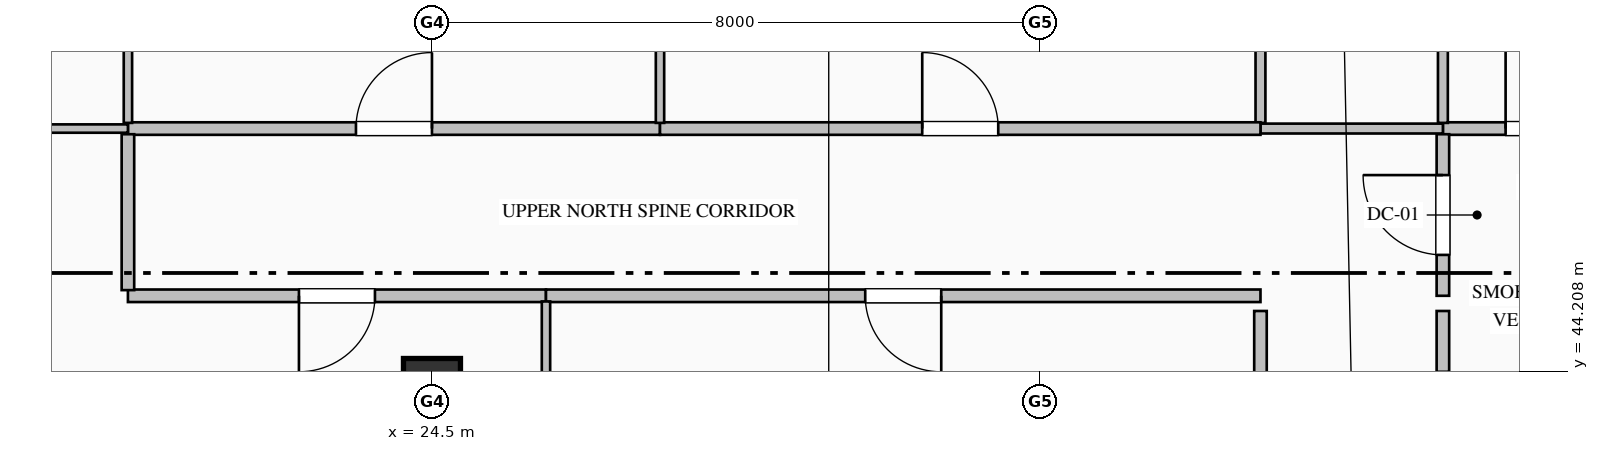
"""IFC4 building model, lengths in metres.
Left out: names, types, materials, properties, quantities, classifications, styles, units other than length and angle.
Written with IfcOpenShell. Run it as: python <this file> out.ifc"""

import sys

from ifc_helpers import new_model, si_unit, direction, frame, frame_2d, origin, origin_2d, place, context, subcontext, project, spatial, rectangle, extrude, element, fill, save


model = new_model("IFC4")
c1 = context("Model", 3, precision=1e-05, world=origin(), true_north=direction((0.0, 1.0)))
c2 = subcontext(c1, "Body", "Model", "MODEL_VIEW")
j1 = project(units=[si_unit("LENGTHUNIT", "METRE"), si_unit("PLANEANGLEUNIT", "RADIAN")], contexts=[c1])
p1 = place(None, origin())
s1 = spatial("IfcSite", under=j1, at=p1, CompositionType="ELEMENT")
p2 = place(p1, origin())
s2 = spatial("IfcBuilding", under=s1, at=p2, CompositionType="ELEMENT")
p3 = place(p2, frame((0.0, 0.0, 343.2)))
s3 = spatial("IfcBuildingStorey", under=s2, at=p3, CompositionType="ELEMENT", Elevation=343.2)
p4 = place(p3, frame((24.5, 44.0, 0.0), z_axis=(0.0, 0.0, 1.0), x_axis=(1.0, 0.0, 0.0)))
e1 = element("IfcColumn", 1, at=p4, inside=s3, PredefinedType="COLUMN", context=c2, shape_type="SweptSolid", body=[
    extrude(rectangle(XDim=0.75, YDim=0.75, at=origin_2d()), origin(), (0.0, 0.0, 1.0), 4.0),
])
p5 = place(p3, frame((16.62, 47.88, 0.0), z_axis=(0.0, 0.0, 1.0), x_axis=(0.707106781187, 0.707106781187, 0.0)))
e2 = element("IfcWall", 2, at=p5, inside=s3, PredefinedType="SOLIDWALL", context=c2, shape_type="SweptSolid", body=[
    extrude(rectangle(XDim=5.657, YDim=0.34, at=frame_2d((2.828, 0.0))), origin(), (0.0, 0.0, 1.0), 3.785),
])
p6 = place(p3, frame((37.8, 47.4, 0.0), z_axis=(0.0, 0.0, 1.0), x_axis=(1.0, 0.0, 0.0)))
e3 = element("IfcWall", 3, at=p6, inside=s3, PredefinedType="PARTITIONING", context=c2, shape_type="SweptSolid", body=[
    extrude(rectangle(XDim=2.7, YDim=0.165, at=frame_2d((1.35, 0.0))), origin(), (0.0, 0.0, 1.0), 3.785),
])
p7 = place(p6, frame((0.825, 0.0, 0.0)))
e4 = element("IfcOpeningElement", 4, at=p7, cuts=e3, PredefinedType="OPENING", context=c2, shape_type="SweptSolid", body=[
    extrude(rectangle(XDim=1.05, YDim=2.15, at=frame_2d((0.525, 1.075))), frame((0.0, 0.093, 0.0), z_axis=(0.0, -1.0, 0.0), x_axis=(1.0, 0.0, 0.0)), (0.0, 0.0, 1.0), 0.185),
])
p8 = place(p3, frame((37.8, 45.2, 0.0), z_axis=(0.0, 0.0, 1.0), x_axis=(0.0, 1.0, 0.0)))
e5 = element("IfcWall", 5, at=p8, inside=s3, PredefinedType="PARTITIONING", context=c2, shape_type="SweptSolid", body=[
    extrude(rectangle(XDim=2.125, YDim=0.165, at=frame_2d((1.063, 0.0))), origin(), (0.0, 0.0, 1.0), 3.785),
])
p9 = place(p8, frame((0.538, 0.0, 0.0)))
e6 = element("IfcOpeningElement", 6, at=p9, cuts=e5, PredefinedType="OPENING", context=c2, shape_type="SweptSolid", body=[
    extrude(rectangle(XDim=1.05, YDim=2.15, at=frame_2d((0.525, 1.075))), frame((0.0, 0.093, 0.0), z_axis=(0.0, -1.0, 0.0), x_axis=(1.0, 0.0, 0.0)), (0.0, 0.0, 1.0), 0.185),
])
p10 = place(p3, frame((37.8, 44.2, 0.0), z_axis=(0.0, 0.0, 1.0), x_axis=(0.0, 1.0, 0.0)))
e7 = element("IfcWall", 7, at=p10, inside=s3, PredefinedType="PARTITIONING", context=c2, shape_type="SweptSolid", body=[
    extrude(rectangle(XDim=0.8, YDim=0.165, at=frame_2d((0.4, 0.0))), origin(), (0.0, 0.0, 1.0), 3.785),
])
p11 = place(p3, frame((37.8, 47.475, 0.0), z_axis=(0.0, 0.0, 1.0), x_axis=(0.0, 1.0, 0.0)))
e8 = element("IfcWall", 8, at=p11, inside=s3, PredefinedType="PARTITIONING", context=c2, shape_type="SweptSolid", body=[
    extrude(rectangle(XDim=4.193, YDim=0.13, at=frame_2d((2.097, 0.0))), origin(), (0.0, 0.0, 1.0), 3.785),
])
p12 = place(p11, frame((1.587, 0.0, 0.0)))
e9 = element("IfcOpeningElement", 9, at=p12, cuts=e8, PredefinedType="OPENING", context=c2, shape_type="SweptSolid", body=[
    extrude(rectangle(XDim=1.02, YDim=2.15, at=frame_2d((0.51, 1.075))), frame((0.0, 0.075, 0.0), z_axis=(0.0, -1.0, 0.0), x_axis=(1.0, 0.0, 0.0)), (0.0, 0.0, 1.0), 0.15),
])
p13 = place(p3, frame((37.8, 47.4, 0.0), z_axis=(0.0, 0.0, 1.0), x_axis=(-1.0, 0.0, 0.0)))
e10 = element("IfcWall", 10, at=p13, inside=s3, PredefinedType="PARTITIONING", context=c2, shape_type="SweptSolid", body=[
    extrude(rectangle(XDim=2.4, YDim=0.13, at=frame_2d((1.2, 0.0))), origin(), (0.0, 0.0, 1.0), 3.785),
])
p14 = place(p3, frame((35.4, 47.475, 0.0), z_axis=(0.0, 0.0, 1.0), x_axis=(0.0, 1.0, 0.0)))
e11 = element("IfcWall", 11, at=p14, inside=s3, PredefinedType="PARTITIONING", context=c2, shape_type="SweptSolid", body=[
    extrude(rectangle(XDim=4.193, YDim=0.13, at=frame_2d((2.097, 0.0))), origin(), (0.0, 0.0, 1.0), 3.785),
])
p15 = place(p3, frame((20.5, 47.4, 0.0), z_axis=(0.0, 0.0, 1.0), x_axis=(1.0, 0.0, 0.0)))
e12 = element("IfcWall", 12, at=p15, inside=s3, PredefinedType="PARTITIONING", context=c2, shape_type="SweptSolid", body=[
    extrude(rectangle(XDim=7.0, YDim=0.165, at=frame_2d((3.5, 0.0))), origin(), (0.0, 0.0, 1.0), 3.785),
])
p16 = place(p15, frame((3.0, 0.0, 0.0)))
e13 = element("IfcOpeningElement", 13, at=p16, cuts=e12, PredefinedType="OPENING", context=c2, shape_type="SweptSolid", body=[
    extrude(rectangle(XDim=1.0, YDim=2.15, at=frame_2d((0.5, 1.075))), frame((0.0, 0.093, 0.0), z_axis=(0.0, -1.0, 0.0), x_axis=(1.0, 0.0, 0.0)), (0.0, 0.0, 1.0), 0.185),
])
p17 = place(p3, frame((27.5, 47.4, 0.0), z_axis=(0.0, 0.0, 1.0), x_axis=(1.0, 0.0, 0.0)))
e14 = element("IfcWall", 14, at=p17, inside=s3, PredefinedType="PARTITIONING", context=c2, shape_type="SweptSolid", body=[
    extrude(rectangle(XDim=7.9, YDim=0.165, at=frame_2d((3.95, 0.0))), origin(), (0.0, 0.0, 1.0), 3.785),
])
p18 = place(p17, frame((3.45, 0.0, 0.0)))
e15 = element("IfcOpeningElement", 15, at=p18, cuts=e14, PredefinedType="OPENING", context=c2, shape_type="SweptSolid", body=[
    extrude(rectangle(XDim=1.0, YDim=2.15, at=frame_2d((0.5, 1.075))), frame((0.0, 0.093, 0.0), z_axis=(0.0, -1.0, 0.0), x_axis=(1.0, 0.0, 0.0)), (0.0, 0.0, 1.0), 0.185),
])
p19 = place(p3, frame((26.0, 45.2, 0.0), z_axis=(0.0, 0.0, 1.0), x_axis=(-1.0, 0.0, 0.0)))
e16 = element("IfcWall", 16, at=p19, inside=s3, PredefinedType="PARTITIONING", context=c2, shape_type="SweptSolid", body=[
    extrude(rectangle(XDim=5.5, YDim=0.165, at=frame_2d((2.75, 0.0))), origin(), (0.0, 0.0, 1.0), 3.785),
])
p20 = place(p19, frame((2.25, 0.0, 0.0)))
e17 = element("IfcOpeningElement", 17, at=p20, cuts=e16, PredefinedType="OPENING", context=c2, shape_type="SweptSolid", body=[
    extrude(rectangle(XDim=1.0, YDim=2.15, at=frame_2d((0.5, 1.075))), frame((0.0, 0.093, 0.0), z_axis=(0.0, -1.0, 0.0), x_axis=(1.0, 0.0, 0.0)), (0.0, 0.0, 1.0), 0.185),
])
p21 = place(p3, frame((20.5, 45.274, 0.0), z_axis=(0.0, 0.0, 1.0), x_axis=(0.0, 1.0, 0.0)))
e18 = element("IfcWall", 18, at=p21, inside=s3, PredefinedType="PARTITIONING", context=c2, shape_type="SweptSolid", body=[
    extrude(rectangle(XDim=2.051, YDim=0.165, at=frame_2d((1.025, 0.0))), origin(), (0.0, 0.0, 1.0), 3.785),
])
p22 = place(p3, frame((35.4, 45.2, 0.0), z_axis=(0.0, 0.0, 1.0), x_axis=(-1.0, 0.0, 0.0)))
e19 = element("IfcWall", 19, at=p22, inside=s3, PredefinedType="PARTITIONING", context=c2, shape_type="SweptSolid", body=[
    extrude(rectangle(XDim=9.4, YDim=0.165, at=frame_2d((4.7, 0.0))), origin(), (0.0, 0.0, 1.0), 3.785),
])
p23 = place(p22, frame((4.2, 0.0, 0.0)))
e20 = element("IfcOpeningElement", 20, at=p23, cuts=e19, PredefinedType="OPENING", context=c2, shape_type="SweptSolid", body=[
    extrude(rectangle(XDim=1.0, YDim=2.15, at=frame_2d((0.5, 1.075))), frame((0.0, 0.093, 0.0), z_axis=(0.0, -1.0, 0.0), x_axis=(1.0, 0.0, 0.0)), (0.0, 0.0, 1.0), 0.185),
])
p24 = place(p3, frame((35.4, 40.057, 0.0), z_axis=(0.0, 0.0, 1.0), x_axis=(0.0, 1.0, 0.0)))
e21 = element("IfcWall", 21, at=p24, inside=s3, PredefinedType="PARTITIONING", context=c2, shape_type="SweptSolid", body=[
    extrude(rectangle(XDim=4.943, YDim=0.165, at=frame_2d((2.472, 0.0))), origin(), (0.0, 0.0, 1.0), 3.785),
])
p25 = place(p3, frame((20.5, 51.531, 0.0), z_axis=(0.0, 0.0, 1.0), x_axis=(0.0, -1.0, 0.0)))
e22 = element("IfcWall", 22, at=p25, inside=s3, PredefinedType="MOVABLE", context=c2, shape_type="SweptSolid", body=[
    extrude(rectangle(XDim=4.056, YDim=0.11, at=frame_2d((2.028, 0.0))), origin(), (0.0, 0.0, 1.0), 3.785),
])
p26 = place(p25, frame((1.528, 0.0, 0.0)))
e23 = element("IfcOpeningElement", 23, at=p26, cuts=e22, PredefinedType="OPENING", context=c2, shape_type="SweptSolid", body=[
    extrude(rectangle(XDim=1.0, YDim=2.15, at=frame_2d((0.5, 1.075))), frame((0.0, 0.065, 0.0), z_axis=(0.0, -1.0, 0.0), x_axis=(1.0, 0.0, 0.0)), (0.0, 0.0, 1.0), 0.13),
])
p27 = place(p3, frame((20.5, 47.4, 0.0), z_axis=(0.0, 0.0, 1.0), x_axis=(-1.0, 0.0, 0.0)))
e24 = element("IfcWall", 24, at=p27, inside=s3, PredefinedType="MOVABLE", context=c2, shape_type="SweptSolid", body=[
    extrude(rectangle(XDim=3.668, YDim=0.11, at=frame_2d((1.834, 0.0))), origin(), (0.0, 0.0, 1.0), 3.785),
])
p28 = place(p3, frame((27.5, 51.668, 0.0), z_axis=(0.0, 0.0, 1.0), x_axis=(0.0, -1.0, 0.0)))
e25 = element("IfcWall", 25, at=p28, inside=s3, PredefinedType="MOVABLE", context=c2, shape_type="SweptSolid", body=[
    extrude(rectangle(XDim=4.193, YDim=0.11, at=frame_2d((2.097, 0.0))), origin(), (0.0, 0.0, 1.0), 3.785),
])
p29 = place(p3, frame((26.0, 45.125, 0.0), z_axis=(0.0, 0.0, 1.0), x_axis=(0.0, -1.0, 0.0)))
e26 = element("IfcWall", 26, at=p29, inside=s3, PredefinedType="MOVABLE", context=c2, shape_type="SweptSolid", body=[
    extrude(rectangle(XDim=5.069, YDim=0.11, at=frame_2d((2.534, 0.0))), origin(), (0.0, 0.0, 1.0), 3.785),
])
p30 = place(p7, origin())
e27 = element("IfcDoor", 27, at=p30, inside=s3, OperationType="SINGLE_SWING_LEFT", PredefinedType="DOOR", context=c2, shape_type="SweptSolid", body=[
    extrude(rectangle(XDim=1.05, YDim=2.15, at=frame_2d((0.525, 1.075))), frame((0.0, 0.025, 0.0), z_axis=(0.0, -1.0, 0.0), x_axis=(1.0, 0.0, 0.0)), (0.0, 0.0, 1.0), 0.05),
])
fill(e4, e27)
p31 = place(p9, origin())
e28 = element("IfcDoor", 28, at=p31, inside=s3, OperationType="SINGLE_SWING_RIGHT", PredefinedType="DOOR", context=c2, shape_type="SweptSolid", body=[
    extrude(rectangle(XDim=1.05, YDim=2.15, at=frame_2d((0.525, 1.075))), frame((0.0, 0.025, 0.0), z_axis=(0.0, -1.0, 0.0), x_axis=(1.0, 0.0, 0.0)), (0.0, 0.0, 1.0), 0.05),
])
fill(e6, e28)
p32 = place(p16, origin())
e29 = element("IfcDoor", 29, at=p32, inside=s3, OperationType="SINGLE_SWING_RIGHT", PredefinedType="DOOR", context=c2, shape_type="SweptSolid", body=[
    extrude(rectangle(XDim=1.0, YDim=2.15, at=frame_2d((0.5, 1.075))), frame((0.0, 0.025, 0.0), z_axis=(0.0, -1.0, 0.0), x_axis=(1.0, 0.0, 0.0)), (0.0, 0.0, 1.0), 0.05),
])
fill(e13, e29)
p33 = place(p18, origin())
e30 = element("IfcDoor", 30, at=p33, inside=s3, OperationType="SINGLE_SWING_LEFT", PredefinedType="DOOR", context=c2, shape_type="SweptSolid", body=[
    extrude(rectangle(XDim=1.0, YDim=2.15, at=frame_2d((0.5, 1.075))), frame((0.0, 0.025, 0.0), z_axis=(0.0, -1.0, 0.0), x_axis=(1.0, 0.0, 0.0)), (0.0, 0.0, 1.0), 0.05),
])
fill(e15, e30)
p34 = place(p20, origin())
e31 = element("IfcDoor", 31, at=p34, inside=s3, OperationType="SINGLE_SWING_RIGHT", PredefinedType="DOOR", context=c2, shape_type="SweptSolid", body=[
    extrude(rectangle(XDim=1.0, YDim=2.15, at=frame_2d((0.5, 1.075))), frame((0.0, 0.025, 0.0), z_axis=(0.0, -1.0, 0.0), x_axis=(1.0, 0.0, 0.0)), (0.0, 0.0, 1.0), 0.05),
])
fill(e17, e31)
p35 = place(p23, origin())
e32 = element("IfcDoor", 32, at=p35, inside=s3, OperationType="SINGLE_SWING_LEFT", PredefinedType="DOOR", context=c2, shape_type="SweptSolid", body=[
    extrude(rectangle(XDim=1.0, YDim=2.15, at=frame_2d((0.5, 1.075))), frame((0.0, 0.025, 0.0), z_axis=(0.0, -1.0, 0.0), x_axis=(1.0, 0.0, 0.0)), (0.0, 0.0, 1.0), 0.05),
])
fill(e20, e32)
save(model, sys.argv[1])
